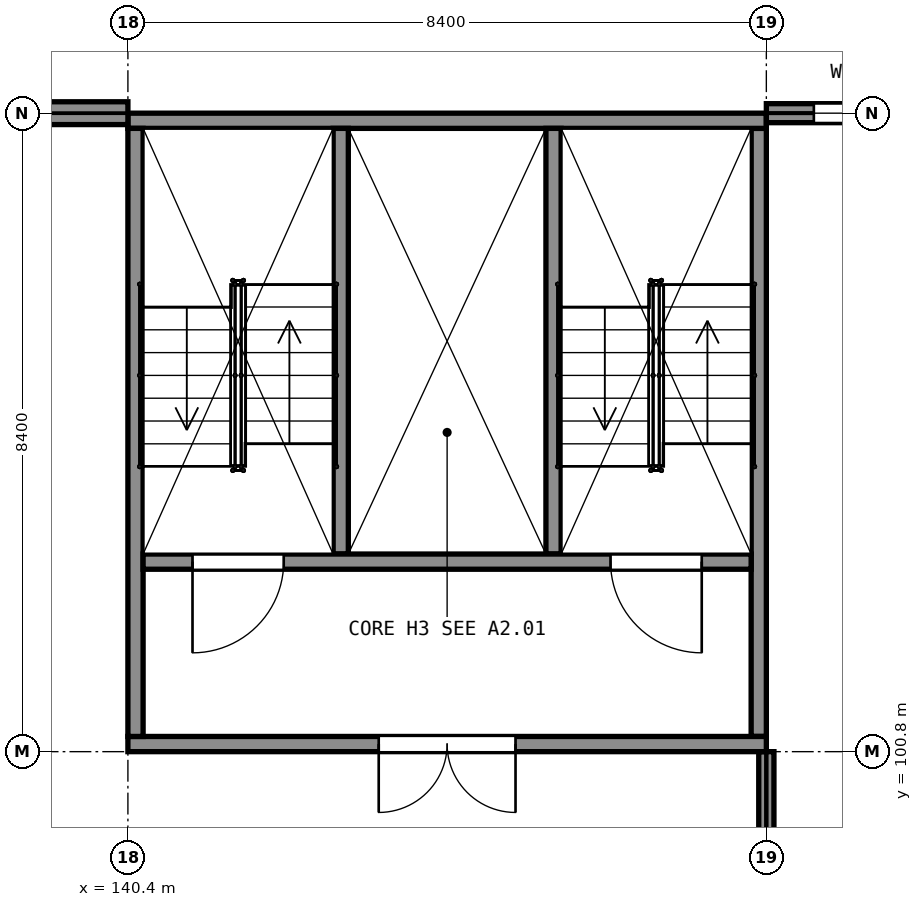
"""IFC4 building model, lengths in metres.
Left out: names, types, materials, properties, quantities, classifications, styles, units other than length and angle.
Written with IfcOpenShell. Run it as: python <this file> out.ifc"""

import sys

from ifc_helpers import new_model, si_unit, direction, frame, frame_2d, origin, place, context, subcontext, project, spatial, polyline, rectangle, outline, extrude, element, fill, save


model = new_model("IFC4")
c1 = context("Model", 3, precision=1e-05, world=origin(), true_north=direction((0.0, 1.0)))
c2 = subcontext(c1, "Body", "Model", "MODEL_VIEW")
j1 = project(units=[si_unit("LENGTHUNIT", "METRE"), si_unit("PLANEANGLEUNIT", "RADIAN")], contexts=[c1])
p1 = place(None, origin())
s1 = spatial("IfcSite", under=j1, at=p1, CompositionType="ELEMENT")
p2 = place(p1, origin())
s2 = spatial("IfcBuilding", under=s1, at=p2, CompositionType="ELEMENT")
p3 = place(p2, frame((0.0, 0.0, 10.5)))
s3 = spatial("IfcBuildingStorey", under=s2, at=p3, CompositionType="ELEMENT", Elevation=10.5)
p4 = place(p3, frame((140.4, 100.9, 0.0), z_axis=(0.0, 0.0, 1.0), x_axis=(1.0, 0.0, 0.0)))
e1 = element("IfcWall", 1, at=p4, inside=s3, PredefinedType="SHEAR", context=c2, shape_type="SweptSolid", body=[
    extrude(rectangle(XDim=8.4, YDim=0.2, at=frame_2d((4.2, 0.0))), origin(), (0.0, 0.0, 1.0), 9.5),
])
p5 = place(p4, frame((3.3, 0.0, 0.0)))
e2 = element("IfcOpeningElement", 2, at=p5, cuts=e1, PredefinedType="OPENING", context=c2, shape_type="SweptSolid", body=[
    extrude(rectangle(XDim=1.8, YDim=2.1, at=frame_2d((0.9, 1.05))), frame((0.0, 0.11, 0.0), z_axis=(0.0, -1.0, 0.0), x_axis=(1.0, 0.0, 0.0)), (0.0, 0.0, 1.0), 0.22),
])
p6 = place(p3, frame((140.4, 109.1, 0.0), z_axis=(0.0, 0.0, 1.0), x_axis=(1.0, 0.0, 0.0)))
e3 = element("IfcWall", 3, at=p6, inside=s3, PredefinedType="SHEAR", context=c2, shape_type="SweptSolid", body=[
    extrude(rectangle(XDim=8.4, YDim=0.2, at=frame_2d((4.2, 0.0))), origin(), (0.0, 0.0, 1.0), 9.5),
])
for number, where, z_axis, x_axis in (
    (4, (140.5, 101.0, 0.0), (0.0, 0.0, 1.0), (0.0, 1.0, 0.0)),
    (5, (148.7, 101.0, 0.0), (0.0, 0.0, 1.0), (0.0, 1.0, 0.0)),
):
    element("IfcWall", number, at=place(p3, frame(where, z_axis=z_axis, x_axis=x_axis)), inside=s3, PredefinedType="SHEAR", context=c2, shape_type="SweptSolid", body=[
        extrude(rectangle(XDim=8.0, YDim=0.2, at=frame_2d((4.0, 0.0))), origin(), (0.0, 0.0, 1.0), 9.5),
    ])
p7 = place(p3, frame((140.6, 103.3, 0.0), z_axis=(0.0, 0.0, 1.0), x_axis=(1.0, 0.0, 0.0)))
e6 = element("IfcWall", 6, at=p7, inside=s3, PredefinedType="SHEAR", context=c2, shape_type="SweptSolid", body=[
    extrude(rectangle(XDim=8.0, YDim=0.2, at=frame_2d((4.0, 0.0))), origin(), (0.0, 0.0, 1.0), 9.5),
])
p8 = place(p7, frame((0.65, 0.0, 0.0)))
e7 = element("IfcOpeningElement", 7, at=p8, cuts=e6, PredefinedType="OPENING", context=c2, shape_type="SweptSolid", body=[
    extrude(rectangle(XDim=1.2, YDim=2.1, at=frame_2d((0.6, 1.05))), frame((0.0, 0.11, 0.0), z_axis=(0.0, -1.0, 0.0), x_axis=(1.0, 0.0, 0.0)), (0.0, 0.0, 1.0), 0.22),
])
p9 = place(p7, frame((6.15, 0.0, 0.0)))
e8 = element("IfcOpeningElement", 8, at=p9, cuts=e6, PredefinedType="OPENING", context=c2, shape_type="SweptSolid", body=[
    extrude(rectangle(XDim=1.2, YDim=2.1, at=frame_2d((0.6, 1.05))), frame((0.0, 0.11, 0.0), z_axis=(0.0, -1.0, 0.0), x_axis=(1.0, 0.0, 0.0)), (0.0, 0.0, 1.0), 0.22),
])
for number, where, z_axis, x_axis in (
    (9, (143.2, 103.4, 0.0), (0.0, 0.0, 1.0), (0.0, 1.0, 0.0)),
    (10, (146.0, 103.4, 0.0), (0.0, 0.0, 1.0), (0.0, 1.0, 0.0)),
):
    element("IfcWall", number, at=place(p3, frame(where, z_axis=z_axis, x_axis=x_axis)), inside=s3, PredefinedType="SHEAR", context=c2, shape_type="SweptSolid", body=[
        extrude(rectangle(XDim=5.6, YDim=0.2, at=frame_2d((2.8, 0.0))), origin(), (0.0, 0.0, 1.0), 9.5),
    ])
p10 = place(p3, frame((148.8, 109.2, 0.0), z_axis=(0.0, 0.0, 1.0), x_axis=(1.0, 0.0, 0.0)))
e11 = element("IfcWall", 11, at=p10, inside=s3, PredefinedType="SOLIDWALL", context=c2, shape_type="SweptSolid", body=[
    extrude(outline(polyline([(0.0, 0.0), (8.05, 0.0), (8.05, 9.442), (0.0, 11.742), (0.0, 0.0)])), frame((0.0, 0.125, 0.0), z_axis=(0.0, -1.0, 0.0), x_axis=(1.0, 0.0, 0.0)), (0.0, 0.0, 1.0), 0.25),
])
p11 = place(p10, frame((0.625, 0.0, 0.9)))
e12 = element("IfcOpeningElement", 12, at=p11, cuts=e11, PredefinedType="OPENING", context=c2, shape_type="SweptSolid", body=[
    extrude(rectangle(XDim=1.2, YDim=6.0, at=frame_2d((0.6, 3.0))), frame((0.0, 0.135, 0.0), z_axis=(0.0, -1.0, 0.0), x_axis=(1.0, 0.0, 0.0)), (0.0, 0.0, 1.0), 0.27),
])
p12 = place(p10, frame((3.425, 0.0, 0.9)))
e13 = element("IfcOpeningElement", 13, at=p12, cuts=e11, PredefinedType="OPENING", context=c2, shape_type="SweptSolid", body=[
    extrude(rectangle(XDim=1.2, YDim=6.0, at=frame_2d((0.6, 3.0))), frame((0.0, 0.135, 0.0), z_axis=(0.0, -1.0, 0.0), x_axis=(1.0, 0.0, 0.0)), (0.0, 0.0, 1.0), 0.27),
])
p13 = place(p10, frame((6.225, 0.0, 0.9)))
e14 = element("IfcOpeningElement", 14, at=p13, cuts=e11, PredefinedType="OPENING", context=c2, shape_type="SweptSolid", body=[
    extrude(rectangle(XDim=1.2, YDim=6.0, at=frame_2d((0.6, 3.0))), frame((0.0, 0.135, 0.0), z_axis=(0.0, -1.0, 0.0), x_axis=(1.0, 0.0, 0.0)), (0.0, 0.0, 1.0), 0.27),
])
p14 = place(p3, frame((132.0, 109.2, 0.0), z_axis=(0.0, 0.0, 1.0), x_axis=(1.0, 0.0, 0.0)))
e15 = element("IfcWall", 15, at=p14, inside=s3, PredefinedType="SOLIDWALL", context=c2, shape_type="SweptSolid", body=[
    extrude(rectangle(XDim=8.4, YDim=0.3, at=frame_2d((4.2, 0.0))), origin(), (0.0, 0.0, 1.0), 8.44),
])
p15 = place(p14, frame((2.5, 0.0, 1.5)))
e16 = element("IfcOpeningElement", 16, at=p15, cuts=e15, PredefinedType="OPENING", context=c2, shape_type="SweptSolid", body=[
    extrude(rectangle(XDim=0.6, YDim=6.0, at=frame_2d((0.3, 3.0))), frame((0.0, 0.16, 0.0), z_axis=(0.0, -1.0, 0.0), x_axis=(1.0, 0.0, 0.0)), (0.0, 0.0, 1.0), 0.32),
])
p16 = place(p14, frame((5.3, 0.0, 1.5)))
e17 = element("IfcOpeningElement", 17, at=p16, cuts=e15, PredefinedType="OPENING", context=c2, shape_type="SweptSolid", body=[
    extrude(rectangle(XDim=0.6, YDim=6.0, at=frame_2d((0.3, 3.0))), frame((0.0, 0.16, 0.0), z_axis=(0.0, -1.0, 0.0), x_axis=(1.0, 0.0, 0.0)), (0.0, 0.0, 1.0), 0.32),
])
p17 = place(p3, frame((148.8, 92.75, 0.0), z_axis=(0.0, 0.0, 1.0), x_axis=(0.0, 1.0, 0.0)))
e18 = element("IfcWall", 18, at=p17, inside=s3, PredefinedType="PARTITIONING", context=c2, shape_type="SweptSolid", body=[
    extrude(rectangle(XDim=8.05, YDim=0.2, at=frame_2d((4.025, 0.0))), origin(), (0.0, 0.0, 1.0), 8.4),
])
p18 = place(p17, frame((4.625, 0.0, 0.0)))
e19 = element("IfcOpeningElement", 19, at=p18, cuts=e18, PredefinedType="OPENING", context=c2, shape_type="SweptSolid", body=[
    extrude(rectangle(XDim=2.4, YDim=2.4, at=frame_2d((1.2, 1.2))), frame((0.0, 0.11, 0.0), z_axis=(0.0, -1.0, 0.0), x_axis=(1.0, 0.0, 0.0)), (0.0, 0.0, 1.0), 0.22),
])
p19 = place(p11, origin())
e20 = element("IfcWindow", 20, at=p19, inside=s3, PartitioningType="SINGLE_PANEL", PredefinedType="WINDOW", context=c2, shape_type="SweptSolid", body=[
    extrude(rectangle(XDim=1.2, YDim=6.0, at=frame_2d((0.6, 3.0))), frame((0.0, -0.045, 0.0), z_axis=(0.0, -1.0, 0.0), x_axis=(1.0, 0.0, 0.0)), (0.0, 0.0, 1.0), 0.06),
])
fill(e12, e20)
p20 = place(p5, origin())
e21 = element("IfcDoor", 21, at=p20, inside=s3, OperationType="DOUBLE_DOOR_SINGLE_SWING", PredefinedType="DOOR", context=c2, shape_type="SweptSolid", body=[
    extrude(rectangle(XDim=1.8, YDim=2.1, at=frame_2d((0.9, 1.05))), frame((0.0, 0.025, 0.0), z_axis=(0.0, -1.0, 0.0), x_axis=(1.0, 0.0, 0.0)), (0.0, 0.0, 1.0), 0.05),
])
fill(e2, e21)
p21 = place(p8, origin())
e22 = element("IfcDoor", 22, at=p21, inside=s3, OperationType="SINGLE_SWING_LEFT", PredefinedType="DOOR", context=c2, shape_type="SweptSolid", body=[
    extrude(rectangle(XDim=1.2, YDim=2.1, at=frame_2d((0.6, 1.05))), frame((0.0, 0.025, 0.0), z_axis=(0.0, -1.0, 0.0), x_axis=(1.0, 0.0, 0.0)), (0.0, 0.0, 1.0), 0.05),
])
fill(e7, e22)
p22 = place(p9, origin())
e23 = element("IfcDoor", 23, at=p22, inside=s3, OperationType="SINGLE_SWING_RIGHT", PredefinedType="DOOR", context=c2, shape_type="SweptSolid", body=[
    extrude(rectangle(XDim=1.2, YDim=2.1, at=frame_2d((0.6, 1.05))), frame((0.0, 0.025, 0.0), z_axis=(0.0, -1.0, 0.0), x_axis=(1.0, 0.0, 0.0)), (0.0, 0.0, 1.0), 0.05),
])
fill(e8, e23)
save(model, sys.argv[1])
